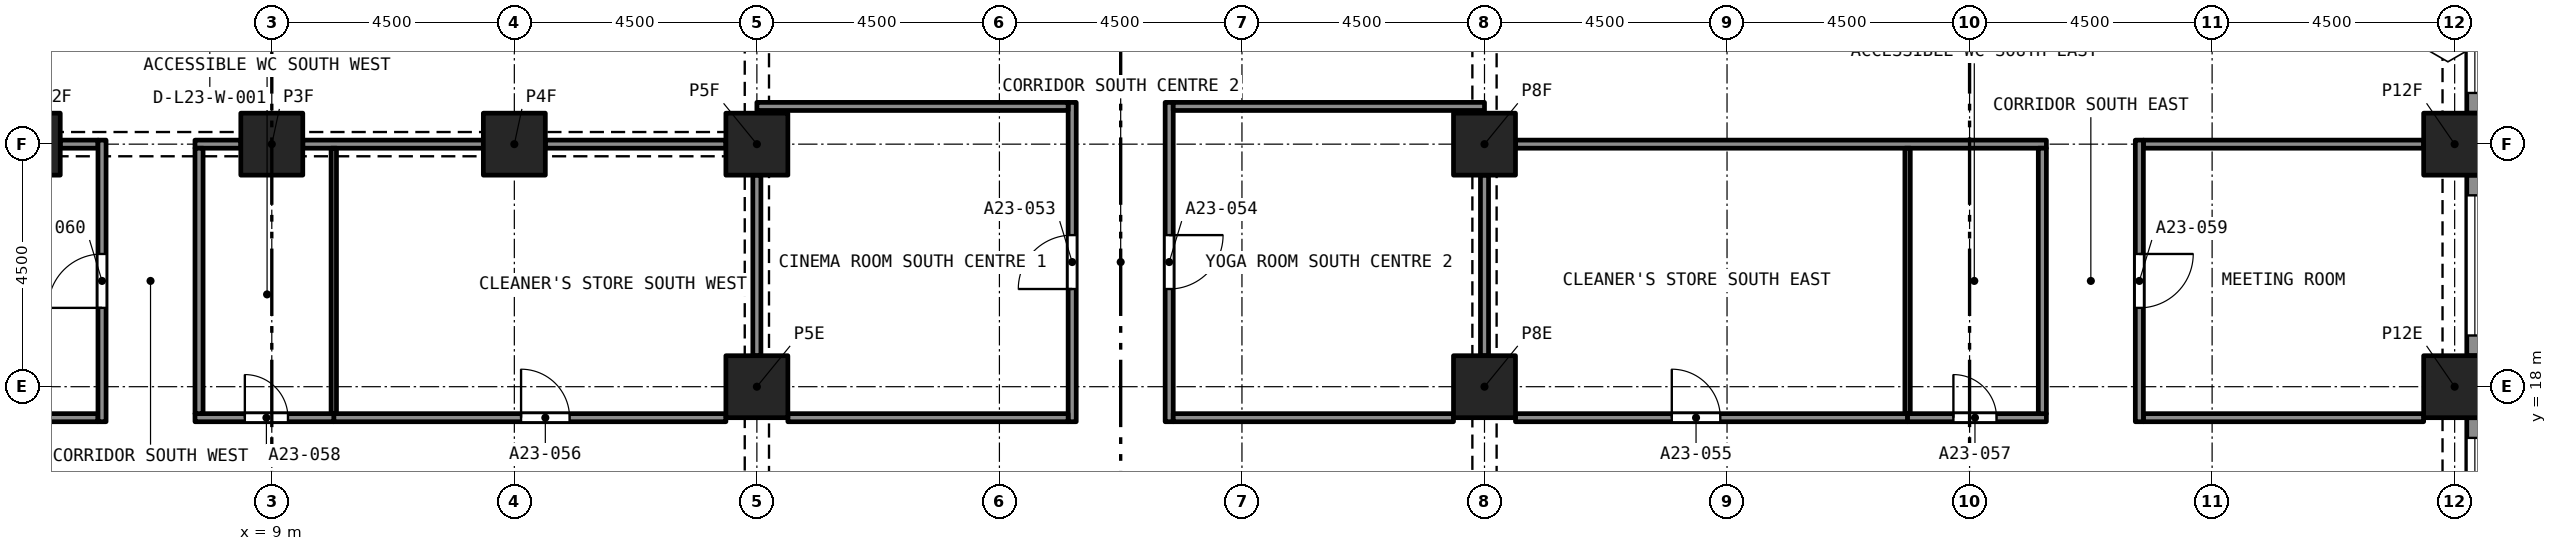
"""IFC4 building model, lengths in metres.
Left out: names, types, materials, properties, quantities, classifications, styles, units other than length and angle.
Written with IfcOpenShell. Run it as: python <this file> out.ifc"""

import sys

from ifc_helpers import new_model, si_unit, direction, frame, frame_2d, origin, origin_2d, place, context, subcontext, project, spatial, rectangle, extrude, element, fill, save


model = new_model("IFC4")
c1 = context("Model", 3, precision=1e-05, world=origin(), true_north=direction((0.0, 1.0)))
c2 = subcontext(c1, "Body", "Model", "MODEL_VIEW")
j1 = project(units=[si_unit("LENGTHUNIT", "METRE"), si_unit("PLANEANGLEUNIT", "RADIAN")], contexts=[c1])
p1 = place(None, origin())
s1 = spatial("IfcSite", under=j1, at=p1, CompositionType="ELEMENT")
p2 = place(p1, origin())
s2 = spatial("IfcBuilding", under=s1, at=p2, CompositionType="ELEMENT")
p3 = place(p2, frame((0.0, 0.0, 86.4)))
s3 = spatial("IfcBuildingStorey", under=s2, at=p3, CompositionType="ELEMENT", Elevation=86.4)
for number, where, z_axis, x_axis in (
    (1, (18.0, 18.0, 0.0), (0.0, 0.0, 1.0), (1.0, 0.0, 0.0)),
    (2, (31.5, 18.0, 0.0), (0.0, 0.0, 1.0), (1.0, 0.0, 0.0)),
    (3, (49.5, 18.0, 0.0), (0.0, 0.0, 1.0), (1.0, 0.0, 0.0)),
    (4, (4.5, 22.5, 0.0), (0.0, 0.0, 1.0), (1.0, 0.0, 0.0)),
    (5, (9.0, 22.5, 0.0), (0.0, 0.0, 1.0), (1.0, 0.0, 0.0)),
    (6, (13.5, 22.5, 0.0), (0.0, 0.0, 1.0), (1.0, 0.0, 0.0)),
    (7, (18.0, 22.5, 0.0), (0.0, 0.0, 1.0), (1.0, 0.0, 0.0)),
    (8, (31.5, 22.5, 0.0), (0.0, 0.0, 1.0), (1.0, 0.0, 0.0)),
    (9, (49.5, 22.5, 0.0), (0.0, 0.0, 1.0), (1.0, 0.0, 0.0)),
):
    element("IfcColumn", number, at=place(p3, frame(where, z_axis=z_axis, x_axis=x_axis)), inside=s3, PredefinedType="COLUMN", context=c2, shape_type="SweptSolid", body=[
        extrude(rectangle(XDim=1.15, YDim=1.15, at=origin_2d()), origin(), (0.0, 0.0, 1.0), 3.2),
    ])
p4 = place(p3, frame((49.875, 17.425, 0.0), z_axis=(0.0, 0.0, 1.0), x_axis=(0.0, -1.0, 0.0)))
e10 = element("IfcWall", 10, at=p4, inside=s3, PredefinedType="SOLIDWALL", context=c2, shape_type="SweptSolid", body=[
    extrude(rectangle(XDim=3.35, YDim=0.3, at=frame_2d((1.675, 0.0))), origin(), (0.0, 0.0, 1.0), 3.2),
])
p5 = place(p4, frame((0.375, 0.0, 0.45)))
e11 = element("IfcOpeningElement", 11, at=p5, cuts=e10, PredefinedType="OPENING", context=c2, shape_type="SweptSolid", body=[
    extrude(rectangle(XDim=2.6, YDim=1.95, at=frame_2d((1.3, 0.975))), frame((0.0, 0.16, 0.0), z_axis=(0.0, -1.0, 0.0), x_axis=(1.0, 0.0, 0.0)), (0.0, 0.0, 1.0), 0.32),
])
p6 = place(p3, frame((49.875, 21.925, 0.0), z_axis=(0.0, 0.0, 1.0), x_axis=(0.0, -1.0, 0.0)))
e12 = element("IfcWall", 12, at=p6, inside=s3, PredefinedType="SOLIDWALL", context=c2, shape_type="SweptSolid", body=[
    extrude(rectangle(XDim=3.35, YDim=0.3, at=frame_2d((1.675, 0.0))), origin(), (0.0, 0.0, 1.0), 3.2),
])
p7 = place(p6, frame((0.375, 0.0, 0.45)))
e13 = element("IfcOpeningElement", 13, at=p7, cuts=e12, PredefinedType="OPENING", context=c2, shape_type="SweptSolid", body=[
    extrude(rectangle(XDim=2.6, YDim=1.95, at=frame_2d((1.3, 0.975))), frame((0.0, 0.16, 0.0), z_axis=(0.0, -1.0, 0.0), x_axis=(1.0, 0.0, 0.0)), (0.0, 0.0, 1.0), 0.32),
])
p8 = place(p3, frame((49.875, 26.425, 0.0), z_axis=(0.0, 0.0, 1.0), x_axis=(0.0, -1.0, 0.0)))
e14 = element("IfcWall", 14, at=p8, inside=s3, PredefinedType="SOLIDWALL", context=c2, shape_type="SweptSolid", body=[
    extrude(rectangle(XDim=3.35, YDim=0.3, at=frame_2d((1.675, 0.0))), origin(), (0.0, 0.0, 1.0), 3.2),
])
p9 = place(p8, frame((0.375, 0.0, 0.45)))
e15 = element("IfcOpeningElement", 15, at=p9, cuts=e14, PredefinedType="OPENING", context=c2, shape_type="SweptSolid", body=[
    extrude(rectangle(XDim=2.6, YDim=1.95, at=frame_2d((1.3, 0.975))), frame((0.0, 0.16, 0.0), z_axis=(0.0, -1.0, 0.0), x_axis=(1.0, 0.0, 0.0)), (0.0, 0.0, 1.0), 0.32),
])
p10 = place(p3, frame((23.85, 17.35, 0.0), z_axis=(0.0, 0.0, 1.0), x_axis=(0.0, 1.0, 0.0)))
e16 = element("IfcWall", 16, at=p10, inside=s3, PredefinedType="PARTITIONING", context=c2, shape_type="SweptSolid", body=[
    extrude(rectangle(XDim=5.925, YDim=0.15, at=frame_2d((2.962, 0.0))), origin(), (0.0, 0.0, 1.0), 2.75),
])
p11 = place(p10, frame((2.462, 0.0, 0.0)))
e17 = element("IfcOpeningElement", 17, at=p11, cuts=e16, PredefinedType="OPENING", context=c2, shape_type="SweptSolid", body=[
    extrude(rectangle(XDim=1.0, YDim=2.1, at=frame_2d((0.5, 1.05))), frame((0.0, 0.085, 0.0), z_axis=(0.0, -1.0, 0.0), x_axis=(1.0, 0.0, 0.0)), (0.0, 0.0, 1.0), 0.17),
])
p12 = place(p3, frame((25.65, 23.275, 0.0), z_axis=(0.0, 0.0, 1.0), x_axis=(0.0, -1.0, 0.0)))
e18 = element("IfcWall", 18, at=p12, inside=s3, PredefinedType="PARTITIONING", context=c2, shape_type="SweptSolid", body=[
    extrude(rectangle(XDim=5.925, YDim=0.15, at=frame_2d((2.962, 0.0))), origin(), (0.0, 0.0, 1.0), 2.75),
])
p13 = place(p12, frame((2.462, 0.0, 0.0)))
e19 = element("IfcOpeningElement", 19, at=p13, cuts=e18, PredefinedType="OPENING", context=c2, shape_type="SweptSolid", body=[
    extrude(rectangle(XDim=1.0, YDim=2.1, at=frame_2d((0.5, 1.05))), frame((0.0, 0.085, 0.0), z_axis=(0.0, -1.0, 0.0), x_axis=(1.0, 0.0, 0.0)), (0.0, 0.0, 1.0), 0.17),
])
for number, where, z_axis, x_axis in (
    (20, (18.575, 17.425, 0.0), (0.0, 0.0, 1.0), (1.0, 0.0, 0.0)),
    (21, (25.725, 17.425, 0.0), (0.0, 0.0, 1.0), (1.0, 0.0, 0.0)),
):
    element("IfcWall", number, at=place(p3, frame(where, z_axis=z_axis, x_axis=x_axis)), inside=s3, PredefinedType="PARTITIONING", context=c2, shape_type="SweptSolid", body=[
        extrude(rectangle(XDim=5.2, YDim=0.15, at=frame_2d((2.6, 0.0))), origin(), (0.0, 0.0, 1.0), 2.75),
    ])
p14 = place(p3, frame((32.075, 17.425, 0.0), z_axis=(0.0, 0.0, 1.0), x_axis=(1.0, 0.0, 0.0)))
e22 = element("IfcWall", 22, at=p14, inside=s3, PredefinedType="PARTITIONING", context=c2, shape_type="SweptSolid", body=[
    extrude(rectangle(XDim=7.275, YDim=0.15, at=frame_2d((3.638, 0.0))), origin(), (0.0, 0.0, 1.0), 2.9),
])
p15 = place(p14, frame((2.9, 0.0, 0.0)))
e23 = element("IfcOpeningElement", 23, at=p15, cuts=e22, PredefinedType="OPENING", context=c2, shape_type="SweptSolid", body=[
    extrude(rectangle(XDim=0.9, YDim=2.1, at=frame_2d((0.45, 1.05))), frame((0.0, 0.085, 0.0), z_axis=(0.0, -1.0, 0.0), x_axis=(1.0, 0.0, 0.0)), (0.0, 0.0, 1.0), 0.17),
])
p16 = place(p3, frame((10.15, 17.425, 0.0), z_axis=(0.0, 0.0, 1.0), x_axis=(1.0, 0.0, 0.0)))
e24 = element("IfcWall", 24, at=p16, inside=s3, PredefinedType="PARTITIONING", context=c2, shape_type="SweptSolid", body=[
    extrude(rectangle(XDim=7.275, YDim=0.15, at=frame_2d((3.638, 0.0))), origin(), (0.0, 0.0, 1.0), 2.9),
])
p17 = place(p16, frame((3.475, 0.0, 0.0)))
e25 = element("IfcOpeningElement", 25, at=p17, cuts=e24, PredefinedType="OPENING", context=c2, shape_type="SweptSolid", body=[
    extrude(rectangle(XDim=0.9, YDim=2.1, at=frame_2d((0.45, 1.05))), frame((0.0, 0.085, 0.0), z_axis=(0.0, -1.0, 0.0), x_axis=(1.0, 0.0, 0.0)), (0.0, 0.0, 1.0), 0.17),
])
p18 = place(p3, frame((39.35, 17.425, 0.0), z_axis=(0.0, 0.0, 1.0), x_axis=(1.0, 0.0, 0.0)))
e26 = element("IfcWall", 26, at=p18, inside=s3, PredefinedType="PARTITIONING", context=c2, shape_type="SweptSolid", body=[
    extrude(rectangle(XDim=2.575, YDim=0.15, at=frame_2d((1.288, 0.0))), origin(), (0.0, 0.0, 1.0), 2.9),
])
p19 = place(p18, frame((0.85, 0.0, 0.0)))
e27 = element("IfcOpeningElement", 27, at=p19, cuts=e26, PredefinedType="OPENING", context=c2, shape_type="SweptSolid", body=[
    extrude(rectangle(XDim=0.8, YDim=2.1, at=frame_2d((0.4, 1.05))), frame((0.0, 0.085, 0.0), z_axis=(0.0, -1.0, 0.0), x_axis=(1.0, 0.0, 0.0)), (0.0, 0.0, 1.0), 0.17),
])
p20 = place(p3, frame((7.575, 17.425, 0.0), z_axis=(0.0, 0.0, 1.0), x_axis=(1.0, 0.0, 0.0)))
e28 = element("IfcWall", 28, at=p20, inside=s3, PredefinedType="PARTITIONING", context=c2, shape_type="SweptSolid", body=[
    extrude(rectangle(XDim=2.575, YDim=0.15, at=frame_2d((1.288, 0.0))), origin(), (0.0, 0.0, 1.0), 2.9),
])
p21 = place(p20, frame((0.925, 0.0, 0.0)))
e29 = element("IfcOpeningElement", 29, at=p21, cuts=e28, PredefinedType="OPENING", context=c2, shape_type="SweptSolid", body=[
    extrude(rectangle(XDim=0.8, YDim=2.1, at=frame_2d((0.4, 1.05))), frame((0.0, 0.085, 0.0), z_axis=(0.0, -1.0, 0.0), x_axis=(1.0, 0.0, 0.0)), (0.0, 0.0, 1.0), 0.17),
])
for number, where, z_axis, x_axis in (
    (30, (43.725, 17.425, 0.0), (0.0, 0.0, 1.0), (1.0, 0.0, 0.0)),
    (31, (0.575, 17.425, 0.0), (0.0, 0.0, 1.0), (1.0, 0.0, 0.0)),
):
    element("IfcWall", number, at=place(p3, frame(where, z_axis=z_axis, x_axis=x_axis)), inside=s3, PredefinedType="PARTITIONING", context=c2, shape_type="SweptSolid", body=[
        extrude(rectangle(XDim=5.2, YDim=0.15, at=frame_2d((2.6, 0.0))), origin(), (0.0, 0.0, 1.0), 2.9),
    ])
p22 = place(p3, frame((18.0, 23.2, 0.0), z_axis=(0.0, 0.0, 1.0), x_axis=(1.0, 0.0, 0.0)))
e32 = element("IfcWall", 32, at=p22, inside=s3, PredefinedType="PARTITIONING", context=c2, shape_type="SweptSolid", body=[
    extrude(rectangle(XDim=5.775, YDim=0.15, at=frame_2d((2.887, 0.0))), origin(), (0.0, 0.0, 1.0), 2.75),
])
p23 = place(p3, frame((18.0, 18.575, 0.0), z_axis=(0.0, 0.0, 1.0), x_axis=(0.0, 1.0, 0.0)))
e33 = element("IfcWall", 33, at=p23, inside=s3, PredefinedType="PARTITIONING", context=c2, shape_type="SweptSolid", body=[
    extrude(rectangle(XDim=3.35, YDim=0.15, at=frame_2d((1.675, 0.0))), origin(), (0.0, 0.0, 1.0), 2.38),
])
p24 = place(p3, frame((25.725, 23.2, 0.0), z_axis=(0.0, 0.0, 1.0), x_axis=(1.0, 0.0, 0.0)))
e34 = element("IfcWall", 34, at=p24, inside=s3, PredefinedType="PARTITIONING", context=c2, shape_type="SweptSolid", body=[
    extrude(rectangle(XDim=5.775, YDim=0.15, at=frame_2d((2.887, 0.0))), origin(), (0.0, 0.0, 1.0), 2.75),
])
p25 = place(p3, frame((31.5, 18.575, 0.0), z_axis=(0.0, 0.0, 1.0), x_axis=(0.0, 1.0, 0.0)))
e35 = element("IfcWall", 35, at=p25, inside=s3, PredefinedType="PARTITIONING", context=c2, shape_type="SweptSolid", body=[
    extrude(rectangle(XDim=3.35, YDim=0.15, at=frame_2d((1.675, 0.0))), origin(), (0.0, 0.0, 1.0), 2.38),
])
p26 = place(p3, frame((32.075, 22.5, 0.0), z_axis=(0.0, 0.0, 1.0), x_axis=(1.0, 0.0, 0.0)))
e36 = element("IfcWall", 36, at=p26, inside=s3, PredefinedType="PARTITIONING", context=c2, shape_type="SweptSolid", body=[
    extrude(rectangle(XDim=9.85, YDim=0.15, at=frame_2d((4.925, 0.0))), origin(), (0.0, 0.0, 1.0), 2.9),
])
p27 = place(p3, frame((43.725, 22.5, 0.0), z_axis=(0.0, 0.0, 1.0), x_axis=(1.0, 0.0, 0.0)))
e37 = element("IfcWall", 37, at=p27, inside=s3, PredefinedType="PARTITIONING", context=c2, shape_type="SweptSolid", body=[
    extrude(rectangle(XDim=5.2, YDim=0.15, at=frame_2d((2.6, 0.0))), origin(), (0.0, 0.0, 1.0), 2.9),
])
for number, where, z_axis, x_axis in (
    (38, (14.075, 22.5, 0.0), (0.0, 0.0, 1.0), (1.0, 0.0, 0.0)),
    (39, (9.575, 22.5, 0.0), (0.0, 0.0, 1.0), (1.0, 0.0, 0.0)),
):
    element("IfcWall", number, at=place(p3, frame(where, z_axis=z_axis, x_axis=x_axis)), inside=s3, PredefinedType="PARTITIONING", context=c2, shape_type="SweptSolid", body=[
        extrude(rectangle(XDim=3.35, YDim=0.15, at=frame_2d((1.675, 0.0))), origin(), (0.0, 0.0, 1.0), 2.38),
    ])
p28 = place(p3, frame((7.575, 22.5, 0.0), z_axis=(0.0, 0.0, 1.0), x_axis=(1.0, 0.0, 0.0)))
e40 = element("IfcWall", 40, at=p28, inside=s3, PredefinedType="PARTITIONING", context=c2, shape_type="SweptSolid", body=[
    extrude(rectangle(XDim=0.85, YDim=0.15, at=frame_2d((0.425, 0.0))), origin(), (0.0, 0.0, 1.0), 2.38),
])
p29 = place(p3, frame((5.075, 22.5, 0.0), z_axis=(0.0, 0.0, 1.0), x_axis=(1.0, 0.0, 0.0)))
e41 = element("IfcWall", 41, at=p29, inside=s3, PredefinedType="PARTITIONING", context=c2, shape_type="SweptSolid", body=[
    extrude(rectangle(XDim=0.7, YDim=0.15, at=frame_2d((0.35, 0.0))), origin(), (0.0, 0.0, 1.0), 2.38),
])
p30 = place(p3, frame((41.85, 17.5, 0.0), z_axis=(0.0, 0.0, 1.0), x_axis=(0.0, 1.0, 0.0)))
e42 = element("IfcWall", 42, at=p30, inside=s3, PredefinedType="PARTITIONING", context=c2, shape_type="SweptSolid", body=[
    extrude(rectangle(XDim=4.925, YDim=0.15, at=frame_2d((2.462, 0.0))), origin(), (0.0, 0.0, 1.0), 2.9),
])
p31 = place(p3, frame((43.65, 22.575, 0.0), z_axis=(0.0, 0.0, 1.0), x_axis=(0.0, -1.0, 0.0)))
e43 = element("IfcWall", 43, at=p31, inside=s3, PredefinedType="PARTITIONING", context=c2, shape_type="SweptSolid", body=[
    extrude(rectangle(XDim=5.225, YDim=0.15, at=frame_2d((2.612, 0.0))), origin(), (0.0, 0.0, 1.0), 2.9),
])
p32 = place(p31, frame((2.113, 0.0, 0.0)))
e44 = element("IfcOpeningElement", 44, at=p32, cuts=e43, PredefinedType="OPENING", context=c2, shape_type="SweptSolid", body=[
    extrude(rectangle(XDim=1.0, YDim=2.1, at=frame_2d((0.5, 1.05))), frame((0.0, 0.085, 0.0), z_axis=(0.0, -1.0, 0.0), x_axis=(1.0, 0.0, 0.0)), (0.0, 0.0, 1.0), 0.17),
])
p33 = place(p3, frame((7.65, 17.5, 0.0), z_axis=(0.0, 0.0, 1.0), x_axis=(0.0, 1.0, 0.0)))
e45 = element("IfcWall", 45, at=p33, inside=s3, PredefinedType="PARTITIONING", context=c2, shape_type="SweptSolid", body=[
    extrude(rectangle(XDim=4.925, YDim=0.15, at=frame_2d((2.462, 0.0))), origin(), (0.0, 0.0, 1.0), 2.9),
])
p34 = place(p3, frame((5.85, 17.35, 0.0), z_axis=(0.0, 0.0, 1.0), x_axis=(0.0, 1.0, 0.0)))
e46 = element("IfcWall", 46, at=p34, inside=s3, PredefinedType="PARTITIONING", context=c2, shape_type="SweptSolid", body=[
    extrude(rectangle(XDim=5.225, YDim=0.15, at=frame_2d((2.612, 0.0))), origin(), (0.0, 0.0, 1.0), 2.9),
])
p35 = place(p34, frame((2.113, 0.0, 0.0)))
e47 = element("IfcOpeningElement", 47, at=p35, cuts=e46, PredefinedType="OPENING", context=c2, shape_type="SweptSolid", body=[
    extrude(rectangle(XDim=1.0, YDim=2.1, at=frame_2d((0.5, 1.05))), frame((0.0, 0.085, 0.0), z_axis=(0.0, -1.0, 0.0), x_axis=(1.0, 0.0, 0.0)), (0.0, 0.0, 1.0), 0.17),
])
for number, where, z_axis, x_axis in (
    (48, (39.35, 17.5, 0.0), (0.0, 0.0, 1.0), (0.0, 1.0, 0.0)),
    (49, (10.15, 17.5, 0.0), (0.0, 0.0, 1.0), (0.0, 1.0, 0.0)),
):
    element("IfcWall", number, at=place(p3, frame(where, z_axis=z_axis, x_axis=x_axis)), inside=s3, PredefinedType="PARTITIONING", context=c2, shape_type="SweptSolid", body=[
        extrude(rectangle(XDim=4.925, YDim=0.1, at=frame_2d((2.462, 0.0))), origin(), (0.0, 0.0, 1.0), 2.9),
    ])
p36 = place(p5, origin())
e50 = element("IfcWindow", 50, at=p36, inside=s3, PartitioningType="SINGLE_PANEL", PredefinedType="WINDOW", context=c2, shape_type="SweptSolid", body=[
    extrude(rectangle(XDim=2.6, YDim=1.95, at=frame_2d((1.3, 0.975))), frame((0.0, 0.03, 0.0), z_axis=(0.0, -1.0, 0.0), x_axis=(1.0, 0.0, 0.0)), (0.0, 0.0, 1.0), 0.06),
])
fill(e11, e50)
p37 = place(p7, origin())
e51 = element("IfcWindow", 51, at=p37, inside=s3, PartitioningType="SINGLE_PANEL", PredefinedType="WINDOW", context=c2, shape_type="SweptSolid", body=[
    extrude(rectangle(XDim=2.6, YDim=1.95, at=frame_2d((1.3, 0.975))), frame((0.0, 0.03, 0.0), z_axis=(0.0, -1.0, 0.0), x_axis=(1.0, 0.0, 0.0)), (0.0, 0.0, 1.0), 0.06),
])
fill(e13, e51)
p38 = place(p9, origin())
e52 = element("IfcWindow", 52, at=p38, inside=s3, PartitioningType="SINGLE_PANEL", PredefinedType="WINDOW", context=c2, shape_type="SweptSolid", body=[
    extrude(rectangle(XDim=2.6, YDim=1.95, at=frame_2d((1.3, 0.975))), frame((0.0, 0.03, 0.0), z_axis=(0.0, -1.0, 0.0), x_axis=(1.0, 0.0, 0.0)), (0.0, 0.0, 1.0), 0.06),
])
fill(e15, e52)
p39 = place(p11, origin())
e53 = element("IfcDoor", 53, at=p39, inside=s3, OperationType="SINGLE_SWING_RIGHT", PredefinedType="DOOR", context=c2, shape_type="SweptSolid", body=[
    extrude(rectangle(XDim=1.0, YDim=2.1, at=frame_2d((0.5, 1.05))), frame((0.0, 0.025, 0.0), z_axis=(0.0, -1.0, 0.0), x_axis=(1.0, 0.0, 0.0)), (0.0, 0.0, 1.0), 0.05),
])
fill(e17, e53)
p40 = place(p13, origin())
e54 = element("IfcDoor", 54, at=p40, inside=s3, OperationType="SINGLE_SWING_RIGHT", PredefinedType="DOOR", context=c2, shape_type="SweptSolid", body=[
    extrude(rectangle(XDim=1.0, YDim=2.1, at=frame_2d((0.5, 1.05))), frame((0.0, 0.025, 0.0), z_axis=(0.0, -1.0, 0.0), x_axis=(1.0, 0.0, 0.0)), (0.0, 0.0, 1.0), 0.05),
])
fill(e19, e54)
p41 = place(p15, origin())
e55 = element("IfcDoor", 55, at=p41, inside=s3, OperationType="SINGLE_SWING_LEFT", PredefinedType="DOOR", context=c2, shape_type="SweptSolid", body=[
    extrude(rectangle(XDim=0.9, YDim=2.1, at=frame_2d((0.45, 1.05))), frame((0.0, 0.025, 0.0), z_axis=(0.0, -1.0, 0.0), x_axis=(1.0, 0.0, 0.0)), (0.0, 0.0, 1.0), 0.05),
])
fill(e23, e55)
p42 = place(p17, origin())
e56 = element("IfcDoor", 56, at=p42, inside=s3, OperationType="SINGLE_SWING_RIGHT", PredefinedType="DOOR", context=c2, shape_type="SweptSolid", body=[
    extrude(rectangle(XDim=0.9, YDim=2.1, at=frame_2d((0.45, 1.05))), frame((0.0, 0.025, 0.0), z_axis=(0.0, -1.0, 0.0), x_axis=(1.0, 0.0, 0.0)), (0.0, 0.0, 1.0), 0.05),
])
fill(e25, e56)
p43 = place(p19, origin())
e57 = element("IfcDoor", 57, at=p43, inside=s3, OperationType="SINGLE_SWING_LEFT", PredefinedType="DOOR", context=c2, shape_type="SweptSolid", body=[
    extrude(rectangle(XDim=0.8, YDim=2.1, at=frame_2d((0.4, 1.05))), frame((0.0, 0.025, 0.0), z_axis=(0.0, -1.0, 0.0), x_axis=(1.0, 0.0, 0.0)), (0.0, 0.0, 1.0), 0.05),
])
fill(e27, e57)
p44 = place(p21, origin())
e58 = element("IfcDoor", 58, at=p44, inside=s3, OperationType="SINGLE_SWING_RIGHT", PredefinedType="DOOR", context=c2, shape_type="SweptSolid", body=[
    extrude(rectangle(XDim=0.8, YDim=2.1, at=frame_2d((0.4, 1.05))), frame((0.0, 0.025, 0.0), z_axis=(0.0, -1.0, 0.0), x_axis=(1.0, 0.0, 0.0)), (0.0, 0.0, 1.0), 0.05),
])
fill(e29, e58)
p45 = place(p32, origin())
e59 = element("IfcDoor", 59, at=p45, inside=s3, OperationType="SINGLE_SWING_RIGHT", PredefinedType="DOOR", context=c2, shape_type="SweptSolid", body=[
    extrude(rectangle(XDim=1.0, YDim=2.1, at=frame_2d((0.5, 1.05))), frame((0.0, 0.025, 0.0), z_axis=(0.0, -1.0, 0.0), x_axis=(1.0, 0.0, 0.0)), (0.0, 0.0, 1.0), 0.05),
])
fill(e44, e59)
p46 = place(p35, origin())
e60 = element("IfcDoor", 60, at=p46, inside=s3, OperationType="SINGLE_SWING_LEFT", PredefinedType="DOOR", context=c2, shape_type="SweptSolid", body=[
    extrude(rectangle(XDim=1.0, YDim=2.1, at=frame_2d((0.5, 1.05))), frame((0.0, 0.025, 0.0), z_axis=(0.0, -1.0, 0.0), x_axis=(1.0, 0.0, 0.0)), (0.0, 0.0, 1.0), 0.05),
])
fill(e47, e60)
save(model, sys.argv[1])
